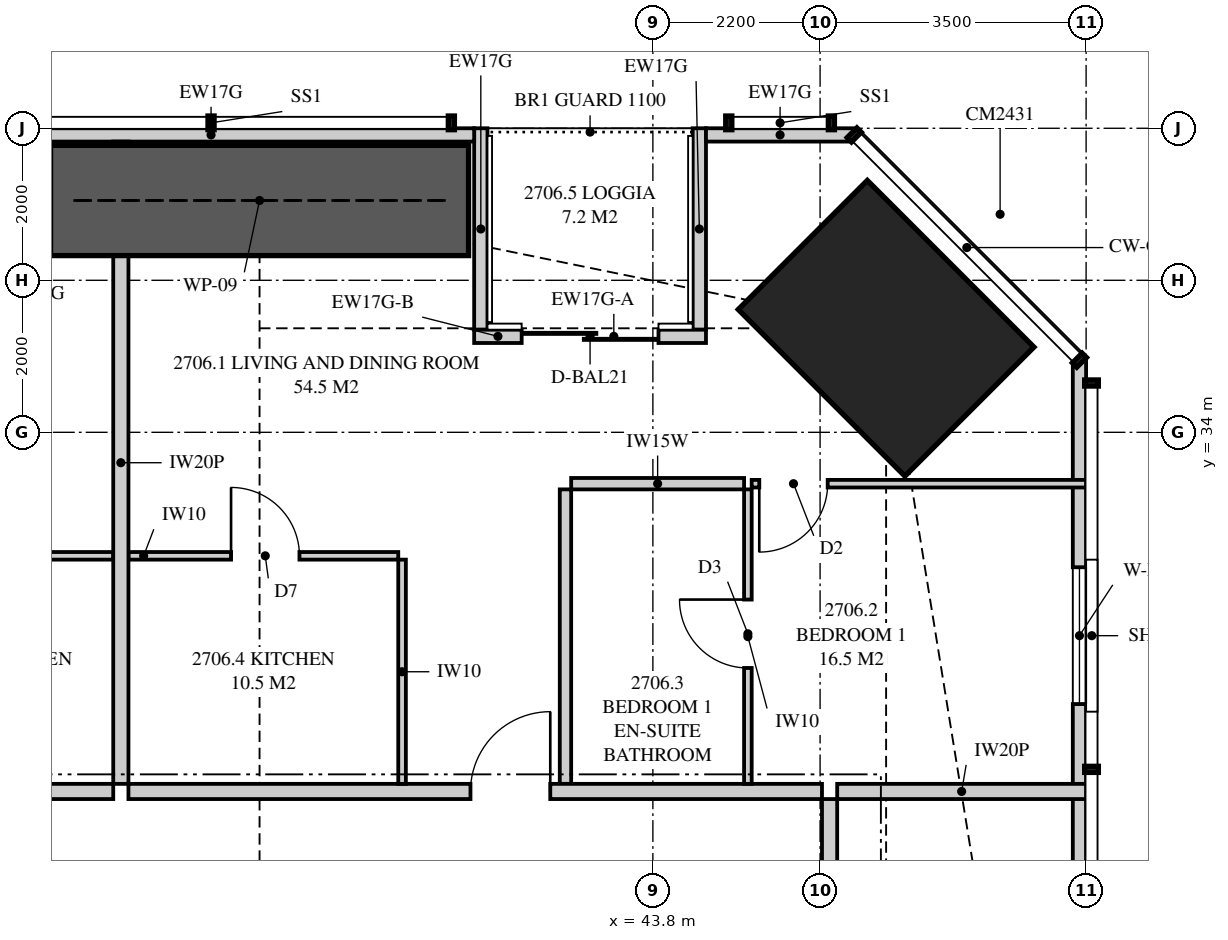
"""IFC4 building model, lengths in metres.
Left out: names, types, materials, properties, quantities, classifications, styles, units other than length and angle.
Written with IfcOpenShell. Run it as: python <this file> out.ifc"""

import sys

from ifc_helpers import new_model, si_unit, direction, frame, frame_2d, origin, origin_2d, place, context, subcontext, project, spatial, polyline, rectangle, outline, extrude, element, fill, save


model = new_model("IFC4")
c1 = context("Model", 3, precision=1e-05, world=origin(), true_north=direction((0.0, 1.0)))
c2 = subcontext(c1, "Body", "Model", "MODEL_VIEW")
j1 = project(units=[si_unit("LENGTHUNIT", "METRE"), si_unit("PLANEANGLEUNIT", "RADIAN")], contexts=[c1])
p1 = place(None, origin())
s1 = spatial("IfcSite", under=j1, at=p1, CompositionType="ELEMENT")
p2 = place(p1, origin())
s2 = spatial("IfcBuilding", under=s1, at=p2, CompositionType="ELEMENT")
p3 = place(p2, frame((0.0, 0.0, 101.5)))
s3 = spatial("IfcBuildingStorey", under=s2, at=p3, CompositionType="ELEMENT", Elevation=101.5)
p4 = place(p3, frame((46.869, 35.369, 0.0), z_axis=(0.0, 0.0, 1.0), x_axis=(-0.707106781187, -0.707106781187, 0.0)))
e1 = element("IfcColumn", 1, at=p4, inside=s3, PredefinedType="COLUMN", context=c2, shape_type="SweptSolid", body=[
    extrude(rectangle(XDim=2.4, YDim=3.1, at=origin_2d()), origin(), (0.0, 0.0, 1.0), 3.35),
])
p5 = place(p3, frame((49.413, 3.051, 0.0), z_axis=(0.0, 0.0, 1.0), x_axis=(0.0, 1.0, 0.0)))
e2 = element("IfcWall", 2, at=p5, inside=s3, PredefinedType="SOLIDWALL", context=c2, shape_type="SweptSolid", body=[
    extrude(outline(polyline([(0.0, 0.0), (31.897, 0.0), (31.897, 3.11), (22.167, 3.11), (22.167, 2.15), (22.074, 2.15), (22.074, 3.11), (21.949, 3.11), (21.949, 2.15), (9.949, 2.15), (9.949, 3.11), (9.823, 3.11), (9.823, 2.15), (9.73, 2.15), (9.73, 3.11), (0.0, 3.11), (0.0, 0.0)])), frame((0.0, 0.087, 0.0), z_axis=(0.0, -1.0, 0.0), x_axis=(1.0, 0.0, 0.0)), (0.0, 0.0, 1.0), 0.175),
])
p6 = place(p5, frame((2.224, 0.0, 0.4)))
e3 = element("IfcOpeningElement", 3, at=p6, cuts=e2, PredefinedType="OPENING", context=c2, shape_type="SweptSolid", body=[
    extrude(rectangle(XDim=1.8, YDim=1.7, at=frame_2d((0.9, 0.85))), frame((0.0, 0.097, 0.0), z_axis=(0.0, -1.0, 0.0), x_axis=(1.0, 0.0, 0.0)), (0.0, 0.0, 1.0), 0.195),
])
p7 = place(p5, frame((14.849, 0.0, 0.4)))
e4 = element("IfcOpeningElement", 4, at=p7, cuts=e2, PredefinedType="OPENING", context=c2, shape_type="SweptSolid", body=[
    extrude(rectangle(XDim=1.2, YDim=1.7, at=frame_2d((0.6, 0.85))), frame((0.0, 0.097, 0.0), z_axis=(0.0, -1.0, 0.0), x_axis=(1.0, 0.0, 0.0)), (0.0, 0.0, 1.0), 0.195),
])
p8 = place(p5, frame((27.373, 0.0, 0.4)))
e5 = element("IfcOpeningElement", 5, at=p8, cuts=e2, PredefinedType="OPENING", context=c2, shape_type="SweptSolid", body=[
    extrude(rectangle(XDim=1.8, YDim=1.7, at=frame_2d((0.9, 0.85))), frame((0.0, 0.097, 0.0), z_axis=(0.0, -1.0, 0.0), x_axis=(1.0, 0.0, 0.0)), (0.0, 0.0, 1.0), 0.195),
])
p9 = place(p3, frame((46.449, 37.913, 0.0), z_axis=(0.0, 0.0, 1.0), x_axis=(-1.0, 0.0, 0.0)))
e6 = element("IfcWall", 6, at=p9, inside=s3, PredefinedType="SOLIDWALL", context=c2, shape_type="SweptSolid", body=[
    extrude(rectangle(XDim=1.95, YDim=0.175, at=frame_2d((0.975, 0.0))), origin(), (0.0, 0.0, 1.0), 3.11),
])
p10 = place(p3, frame((41.449, 37.913, 0.0), z_axis=(0.0, 0.0, 1.0), x_axis=(-1.0, 0.0, 0.0)))
e7 = element("IfcWall", 7, at=p10, inside=s3, PredefinedType="SOLIDWALL", context=c2, shape_type="SweptSolid", body=[
    extrude(outline(polyline([(0.0, 0.0), (6.924, 0.0), (6.924, 2.15), (2.824, 2.15), (2.824, 3.11), (2.666, 3.11), (2.666, 2.15), (2.62, 2.15), (2.62, 3.11), (0.0, 3.11), (0.0, 0.0)])), frame((0.0, 0.087, 0.0), z_axis=(0.0, -1.0, 0.0), x_axis=(1.0, 0.0, 0.0)), (0.0, 0.0, 1.0), 0.175),
])
p11 = place(p3, frame((44.499, 35.262, 0.0), z_axis=(0.0, 0.0, 1.0), x_axis=(-1.0, 0.0, 0.0)))
e8 = element("IfcWall", 8, at=p11, inside=s3, PredefinedType="SOLIDWALL", context=c2, shape_type="SweptSolid", body=[
    extrude(rectangle(XDim=2.425, YDim=0.175, at=frame_2d((1.212, 0.0))), origin(), (0.0, 0.0, 1.0), 2.15),
])
p12 = place(p11, frame((0.625, 0.0, 0.0)))
e9 = element("IfcOpeningElement", 9, at=p12, cuts=e8, PredefinedType="OPENING", context=c2, shape_type="SweptSolid", body=[
    extrude(rectangle(XDim=1.8, YDim=2.1, at=frame_2d((0.9, 1.05))), frame((0.0, 0.097, 0.0), z_axis=(0.0, -1.0, 0.0), x_axis=(1.0, 0.0, 0.0)), (0.0, 0.0, 1.0), 0.195),
])
p13 = place(p3, frame((42.074, 35.262, 0.0), z_axis=(0.0, 0.0, 1.0), x_axis=(-1.0, 0.0, 0.0)))
e10 = element("IfcWall", 10, at=p13, inside=s3, PredefinedType="SOLIDWALL", context=c2, shape_type="SweptSolid", body=[
    extrude(rectangle(XDim=0.625, YDim=0.175, at=frame_2d((0.312, 0.0))), origin(), (0.0, 0.0, 1.0), 2.51),
])
p14 = place(p3, frame((44.411, 38.0, 0.0), z_axis=(0.0, 0.0, 1.0), x_axis=(0.0, -1.0, 0.0)))
e11 = element("IfcWall", 11, at=p14, inside=s3, PredefinedType="SOLIDWALL", context=c2, shape_type="SweptSolid", body=[
    extrude(outline(polyline([(0.0, 0.0), (2.65, 0.0), (2.65, 2.15), (1.296, 2.15), (1.296, 3.11), (0.0, 3.11), (0.0, 0.0)])), frame((0.0, 0.087, 0.0), z_axis=(0.0, -1.0, 0.0), x_axis=(1.0, 0.0, 0.0)), (0.0, 0.0, 1.0), 0.175),
])
p15 = place(p3, frame((41.536, 38.0, 0.0), z_axis=(0.0, 0.0, 1.0), x_axis=(0.0, -1.0, 0.0)))
e12 = element("IfcWall", 12, at=p15, inside=s3, PredefinedType="SOLIDWALL", context=c2, shape_type="SweptSolid", body=[
    extrude(outline(polyline([(0.0, 0.0), (2.65, 0.0), (2.65, 2.51), (2.378, 2.51), (2.378, 2.15), (0.709, 2.15), (0.709, 3.11), (0.0, 3.11), (0.0, 0.0)])), frame((0.0, 0.087, 0.0), z_axis=(0.0, -1.0, 0.0), x_axis=(1.0, 0.0, 0.0)), (0.0, 0.0, 1.0), 0.175),
])
p16 = place(p3, frame((36.8, 37.825, 0.0), z_axis=(0.0, 0.0, 1.0), x_axis=(0.0, -1.0, 0.0)))
e13 = element("IfcWall", 13, at=p16, inside=s3, PredefinedType="PARTITIONING", context=c2, shape_type="SweptSolid", body=[
    extrude(outline(polyline([(0.529, 2.15), (0.0, 2.15), (0.0, 0.0), (0.529, 0.0), (0.529, 0.256), (1.021, 0.256), (1.021, 0.0), (8.45, 0.0), (8.45, 3.11), (1.685, 3.11), (1.685, 2.15), (1.021, 2.15), (1.021, 1.894), (0.529, 1.894), (0.529, 2.15)])), frame((0.0, 0.1, 0.0), z_axis=(0.0, -1.0, 0.0), x_axis=(1.0, 0.0, 0.0)), (0.0, 0.0, 1.0), 0.2),
])
p17 = place(p3, frame((29.3, 29.275, 0.0), z_axis=(0.0, 0.0, 1.0), x_axis=(1.0, 0.0, 0.0)))
e14 = element("IfcWall", 14, at=p17, inside=s3, PredefinedType="PARTITIONING", context=c2, shape_type="SweptSolid", body=[
    extrude(rectangle(XDim=7.4, YDim=0.2, at=frame_2d((3.7, 0.0))), origin(), (0.0, 0.0, 1.0), 3.11),
])
p18 = place(p17, frame((3.2, 0.0, 0.0)))
e15 = element("IfcOpeningElement", 15, at=p18, cuts=e14, PredefinedType="OPENING", context=c2, shape_type="SweptSolid", body=[
    extrude(rectangle(XDim=1.05, YDim=2.2, at=frame_2d((0.525, 1.1))), frame((0.0, 0.11, 0.0), z_axis=(0.0, -1.0, 0.0), x_axis=(1.0, 0.0, 0.0)), (0.0, 0.0, 1.0), 0.22),
])
p19 = place(p3, frame((33.75, 32.375, 0.0), z_axis=(0.0, 0.0, 1.0), x_axis=(1.0, 0.0, 0.0)))
e16 = element("IfcWall", 16, at=p19, inside=s3, PredefinedType="PARTITIONING", context=c2, shape_type="SweptSolid", body=[
    extrude(rectangle(XDim=2.95, YDim=0.1, at=frame_2d((1.475, 0.0))), origin(), (0.0, 0.0, 1.0), 3.11),
])
p20 = place(p19, frame((1.0, 0.0, 0.0)))
e17 = element("IfcOpeningElement", 17, at=p20, cuts=e16, PredefinedType="OPENING", context=c2, shape_type="SweptSolid", body=[
    extrude(rectangle(XDim=0.9, YDim=2.1, at=frame_2d((0.45, 1.05))), frame((0.0, 0.06, 0.0), z_axis=(0.0, -1.0, 0.0), x_axis=(1.0, 0.0, 0.0)), (0.0, 0.0, 1.0), 0.12),
])
p21 = place(p3, frame((36.9, 29.275, 0.0), z_axis=(0.0, 0.0, 1.0), x_axis=(1.0, 0.0, 0.0)))
e18 = element("IfcWall", 18, at=p21, inside=s3, PredefinedType="PARTITIONING", context=c2, shape_type="SweptSolid", body=[
    extrude(outline(polyline([(0.0, 0.0), (9.125, 0.0), (9.125, 3.11), (2.062, 3.11), (2.062, 2.541), (1.388, 2.541), (1.388, 3.11), (0.0, 3.11), (0.0, 0.0)])), frame((0.0, 0.1, 0.0), z_axis=(0.0, -1.0, 0.0), x_axis=(1.0, 0.0, 0.0)), (0.0, 0.0, 1.0), 0.2),
])
p22 = place(p21, frame((4.5, 0.0, 0.0)))
e19 = element("IfcOpeningElement", 19, at=p22, cuts=e18, PredefinedType="OPENING", context=c2, shape_type="SweptSolid", body=[
    extrude(rectangle(XDim=1.05, YDim=2.2, at=frame_2d((0.525, 1.1))), frame((0.0, 0.11, 0.0), z_axis=(0.0, -1.0, 0.0), x_axis=(1.0, 0.0, 0.0)), (0.0, 0.0, 1.0), 0.22),
])
p23 = place(p3, frame((45.05, 33.249, 0.0), z_axis=(0.0, 0.0, 1.0), x_axis=(0.0, -1.0, 0.0)))
e20 = element("IfcWall", 20, at=p23, inside=s3, PredefinedType="PARTITIONING", context=c2, shape_type="SweptSolid", body=[
    extrude(rectangle(XDim=3.874, YDim=0.1, at=frame_2d((1.937, 0.0))), origin(), (0.0, 0.0, 1.0), 3.11),
])
p24 = place(p23, frame((1.45, 0.0, 0.0)))
e21 = element("IfcOpeningElement", 21, at=p24, cuts=e20, PredefinedType="OPENING", context=c2, shape_type="SweptSolid", body=[
    extrude(rectangle(XDim=0.9, YDim=2.1, at=frame_2d((0.45, 1.05))), frame((0.0, 0.06, 0.0), z_axis=(0.0, -1.0, 0.0), x_axis=(1.0, 0.0, 0.0)), (0.0, 0.0, 1.0), 0.12),
])
p25 = place(p3, frame((45.1, 33.324, 0.0), z_axis=(0.0, 0.0, 1.0), x_axis=(1.0, 0.0, 0.0)))
e22 = element("IfcWall", 22, at=p25, inside=s3, PredefinedType="PARTITIONING", context=c2, shape_type="SweptSolid", body=[
    extrude(outline(polyline([(0.0, 0.0), (4.4, 0.0), (4.4, 3.11), (2.971, 3.11), (2.971, 2.15), (1.229, 2.15), (1.229, 3.11), (0.0, 3.11), (0.0, 0.0)])), frame((0.0, 0.05, 0.0), z_axis=(0.0, -1.0, 0.0), x_axis=(1.0, 0.0, 0.0)), (0.0, 0.0, 1.0), 0.1),
])
p26 = place(p25, frame((0.1, 0.0, 0.0)))
e23 = element("IfcOpeningElement", 23, at=p26, cuts=e22, PredefinedType="OPENING", context=c2, shape_type="SweptSolid", body=[
    extrude(rectangle(XDim=0.9, YDim=2.1, at=frame_2d((0.45, 1.05))), frame((0.0, 0.06, 0.0), z_axis=(0.0, -1.0, 0.0), x_axis=(1.0, 0.0, 0.0)), (0.0, 0.0, 1.0), 0.12),
])
p27 = place(p3, frame((42.725, 33.324, 0.0), z_axis=(0.0, 0.0, 1.0), x_axis=(1.0, 0.0, 0.0)))
e24 = element("IfcWall", 24, at=p27, inside=s3, PredefinedType="PLUMBINGWALL", context=c2, shape_type="SweptSolid", body=[
    extrude(rectangle(XDim=2.275, YDim=0.15, at=frame_2d((1.137, 0.0))), origin(), (0.0, 0.0, 1.0), 3.11),
])
p28 = place(p3, frame((42.65, 33.249, 0.0), z_axis=(0.0, 0.0, 1.0), x_axis=(0.0, -1.0, 0.0)))
e25 = element("IfcWall", 25, at=p28, inside=s3, PredefinedType="PLUMBINGWALL", context=c2, shape_type="SweptSolid", body=[
    extrude(rectangle(XDim=3.874, YDim=0.15, at=frame_2d((1.937, 0.0))), origin(), (0.0, 0.0, 1.0), 3.11),
])
p29 = place(p3, frame((36.9, 32.375, 0.0), z_axis=(0.0, 0.0, 1.0), x_axis=(1.0, 0.0, 0.0)))
e26 = element("IfcWall", 26, at=p29, inside=s3, PredefinedType="PARTITIONING", context=c2, shape_type="SweptSolid", body=[
    extrude(outline(polyline([(0.0, 0.0), (3.55, 0.0), (3.55, 3.11), (2.012, 3.11), (2.012, 2.541), (1.438, 2.541), (1.438, 3.11), (0.0, 3.11), (0.0, 0.0)])), frame((0.0, 0.05, 0.0), z_axis=(0.0, -1.0, 0.0), x_axis=(1.0, 0.0, 0.0)), (0.0, 0.0, 1.0), 0.1),
])
p30 = place(p29, frame((1.35, 0.0, 0.0)))
e27 = element("IfcOpeningElement", 27, at=p30, cuts=e26, PredefinedType="OPENING", context=c2, shape_type="SweptSolid", body=[
    extrude(rectangle(XDim=0.9, YDim=2.1, at=frame_2d((0.45, 1.05))), frame((0.0, 0.06, 0.0), z_axis=(0.0, -1.0, 0.0), x_axis=(1.0, 0.0, 0.0)), (0.0, 0.0, 1.0), 0.12),
])
p31 = place(p3, frame((40.5, 32.325, 0.0), z_axis=(0.0, 0.0, 1.0), x_axis=(0.0, -1.0, 0.0)))
e28 = element("IfcWall", 28, at=p31, inside=s3, PredefinedType="PARTITIONING", context=c2, shape_type="SweptSolid", body=[
    extrude(rectangle(XDim=2.95, YDim=0.1, at=frame_2d((1.475, 0.0))), origin(), (0.0, 0.0, 1.0), 3.11),
])
p32 = place(p3, frame((46.225, 29.275, 0.0), z_axis=(0.0, 0.0, 1.0), x_axis=(1.0, 0.0, 0.0)))
e29 = element("IfcWall", 29, at=p32, inside=s3, PredefinedType="PARTITIONING", context=c2, shape_type="SweptSolid", body=[
    extrude(outline(polyline([(0.0, 0.0), (3.275, 0.0), (3.275, 3.11), (2.554, 3.11), (2.554, 2.15), (0.805, 2.15), (0.805, 2.541), (0.306, 2.541), (0.306, 3.11), (0.0, 3.11), (0.0, 0.0)])), frame((0.0, 0.1, 0.0), z_axis=(0.0, -1.0, 0.0), x_axis=(1.0, 0.0, 0.0)), (0.0, 0.0, 1.0), 0.2),
])
p33 = place(p3, frame((46.125, 20.7, 0.0), z_axis=(0.0, 0.0, 1.0), x_axis=(0.0, 1.0, 0.0)))
e30 = element("IfcWall", 30, at=p33, inside=s3, PredefinedType="PARTITIONING", context=c2, shape_type="SweptSolid", body=[
    extrude(outline(polyline([(0.0, 0.0), (8.475, 0.0), (8.475, 3.11), (4.637, 3.11), (4.637, 2.541), (3.963, 2.541), (3.963, 3.11), (0.0, 3.11), (0.0, 0.0)])), frame((0.0, 0.1, 0.0), z_axis=(0.0, -1.0, 0.0), x_axis=(1.0, 0.0, 0.0)), (0.0, 0.0, 1.0), 0.2),
])
p34 = place(p33, frame((6.625, 0.0, 0.0)))
e31 = element("IfcOpeningElement", 31, at=p34, cuts=e30, PredefinedType="OPENING", context=c2, shape_type="SweptSolid", body=[
    extrude(rectangle(XDim=1.0, YDim=2.1, at=frame_2d((0.5, 1.05))), frame((0.0, 0.11, 0.0), z_axis=(0.0, -1.0, 0.0), x_axis=(1.0, 0.0, 0.0)), (0.0, 0.0, 1.0), 0.22),
])
p35 = place(p3, frame((35.875, 37.05, 0.0), z_axis=(0.0, 0.0, 1.0), x_axis=(1.0, 0.0, 0.0)))
e32 = element("IfcWall", 32, at=p35, inside=s3, PredefinedType="SHEAR", context=c2, shape_type="SweptSolid", body=[
    extrude(rectangle(XDim=5.5, YDim=1.45, at=frame_2d((2.75, 0.0))), origin(), (0.0, 0.0, 1.0), 3.35),
])
p36 = place(p8, origin())
e33 = element("IfcWindow", 33, at=p36, inside=s3, PartitioningType="SINGLE_PANEL", PredefinedType="WINDOW", context=c2, shape_type="SweptSolid", body=[
    extrude(rectangle(XDim=1.8, YDim=1.7, at=frame_2d((0.9, 0.85))), frame((0.0, 0.03, 0.0), z_axis=(0.0, -1.0, 0.0), x_axis=(1.0, 0.0, 0.0)), (0.0, 0.0, 1.0), 0.06),
])
fill(e5, e33)
p37 = place(p12, origin())
e34 = element("IfcDoor", 34, at=p37, inside=s3, OperationType="SLIDING_TO_LEFT", PredefinedType="DOOR", context=c2, shape_type="SweptSolid", body=[
    extrude(rectangle(XDim=1.8, YDim=2.1, at=frame_2d((0.9, 1.05))), frame((0.0, 0.025, 0.0), z_axis=(0.0, -1.0, 0.0), x_axis=(1.0, 0.0, 0.0)), (0.0, 0.0, 1.0), 0.05),
])
fill(e9, e34)
p38 = place(p22, origin())
e35 = element("IfcDoor", 35, at=p38, inside=s3, OperationType="SINGLE_SWING_RIGHT", PredefinedType="DOOR", context=c2, shape_type="SweptSolid", body=[
    extrude(rectangle(XDim=1.05, YDim=2.2, at=frame_2d((0.525, 1.1))), frame((0.0, 0.025, 0.0), z_axis=(0.0, -1.0, 0.0), x_axis=(1.0, 0.0, 0.0)), (0.0, 0.0, 1.0), 0.05),
])
fill(e19, e35)
p39 = place(p26, frame((0.9, 0.0, 0.0), z_axis=(0.0, 0.0, 1.0), x_axis=(-1.0, 0.0, 0.0)))
e36 = element("IfcDoor", 36, at=p39, inside=s3, OperationType="SINGLE_SWING_RIGHT", PredefinedType="DOOR", context=c2, shape_type="SweptSolid", body=[
    extrude(rectangle(XDim=0.9, YDim=2.1, at=frame_2d((0.45, 1.05))), frame((0.0, 0.025, 0.0), z_axis=(0.0, -1.0, 0.0), x_axis=(1.0, 0.0, 0.0)), (0.0, 0.0, 1.0), 0.05),
])
fill(e23, e36)
p40 = place(p24, frame((0.9, 0.0, 0.0), z_axis=(0.0, 0.0, 1.0), x_axis=(-1.0, 0.0, 0.0)))
e37 = element("IfcDoor", 37, at=p40, inside=s3, OperationType="SINGLE_SWING_RIGHT", PredefinedType="DOOR", context=c2, shape_type="SweptSolid", body=[
    extrude(rectangle(XDim=0.9, YDim=2.1, at=frame_2d((0.45, 1.05))), frame((0.0, 0.025, 0.0), z_axis=(0.0, -1.0, 0.0), x_axis=(1.0, 0.0, 0.0)), (0.0, 0.0, 1.0), 0.05),
])
fill(e21, e37)
p41 = place(p30, origin())
e38 = element("IfcDoor", 38, at=p41, inside=s3, OperationType="SINGLE_SWING_LEFT", PredefinedType="DOOR", context=c2, shape_type="SweptSolid", body=[
    extrude(rectangle(XDim=0.9, YDim=2.1, at=frame_2d((0.45, 1.05))), frame((0.0, 0.025, 0.0), z_axis=(0.0, -1.0, 0.0), x_axis=(1.0, 0.0, 0.0)), (0.0, 0.0, 1.0), 0.05),
])
fill(e27, e38)
save(model, sys.argv[1])
